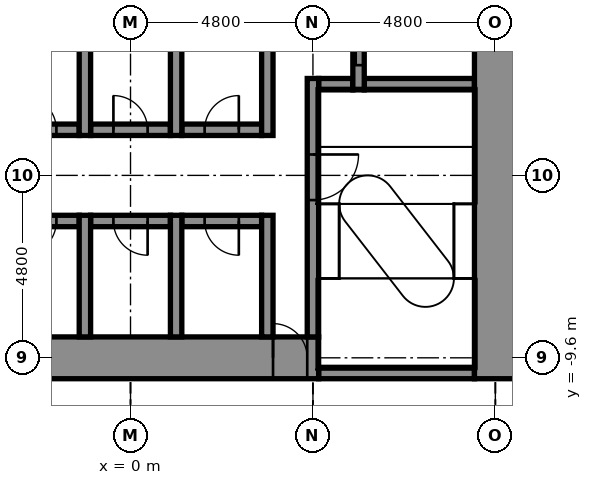
"""IFC4 building model, lengths in metres.
Left out: names, types, materials, properties, quantities, classifications, styles, units other than length and angle.
Written with IfcOpenShell. Run it as: python <this file> out.ifc"""

import sys

from ifc_helpers import new_model, si_unit, direction, frame, frame_2d, origin, place, context, subcontext, project, spatial, rectangle, extrude, element, fill, save


model = new_model("IFC4")
c1 = context("Model", 3, precision=1e-05, world=origin(), true_north=direction((0.0, 1.0)))
c2 = subcontext(c1, "Body", "Model", "MODEL_VIEW")
j1 = project(units=[si_unit("LENGTHUNIT", "METRE"), si_unit("PLANEANGLEUNIT", "RADIAN")], contexts=[c1])
p1 = place(None, origin())
s1 = spatial("IfcSite", under=j1, at=p1, CompositionType="ELEMENT")
p2 = place(p1, origin())
s2 = spatial("IfcBuilding", under=s1, at=p2, CompositionType="ELEMENT")
p3 = place(p2, frame((0.0, 0.0, 60.9)))
s3 = spatial("IfcBuildingStorey", under=s2, at=p3, CompositionType="ELEMENT", Elevation=60.9)
p4 = place(p3, frame((4.95, -10.0, -0.25), z_axis=(0.0, 0.0, 1.0), x_axis=(1.0, 0.0, 0.0)))
e1 = element("IfcWall", 1, at=p4, inside=s3, PredefinedType="STANDARD", context=c2, shape_type="SweptSolid", body=[
    extrude(rectangle(XDim=4.1, YDim=0.3, at=frame_2d((2.05, 0.0))), origin(), (0.0, 0.0, 1.0), 5.45),
])
p5 = place(p3, frame((-5.25, -9.6, -0.25), z_axis=(0.0, 0.0, 1.0), x_axis=(1.0, 0.0, 0.0)))
e2 = element("IfcWall", 2, at=p5, inside=s3, PredefinedType="SHEAR", context=c2, shape_type="SweptSolid", body=[
    extrude(rectangle(XDim=10.2, YDim=1.1, at=frame_2d((5.1, 0.0))), origin(), (0.0, 0.0, 1.0), 5.45),
])
p6 = place(p5, frame((9.0, 0.0, 0.25)))
e3 = element("IfcOpeningElement", 3, at=p6, cuts=e2, PredefinedType="OPENING", context=c2, shape_type="SweptSolid", body=[
    extrude(rectangle(XDim=0.9, YDim=2.1, at=frame_2d((0.45, 1.05))), frame((0.0, 0.56, 0.0), z_axis=(0.0, -1.0, 0.0), x_axis=(1.0, 0.0, 0.0)), (0.0, 0.0, 1.0), 1.12),
])
p7 = place(p3, frame((-3.45, -6.0, -0.25), z_axis=(0.0, 0.0, 1.0), x_axis=(1.0, 0.0, 0.0)))
e4 = element("IfcWall", 4, at=p7, inside=s3, PredefinedType="STANDARD", context=c2, shape_type="SweptSolid", body=[
    extrude(rectangle(XDim=2.1, YDim=0.3, at=frame_2d((1.05, 0.0))), origin(), (0.0, 0.0, 1.0), 5.45),
])
p8 = place(p7, frame((0.6, 0.0, 0.25)))
e5 = element("IfcOpeningElement", 5, at=p8, cuts=e4, PredefinedType="OPENING", context=c2, shape_type="SweptSolid", body=[
    extrude(rectangle(XDim=0.9, YDim=2.1, at=frame_2d((0.45, 1.05))), frame((0.0, 0.16, 0.0), z_axis=(0.0, -1.0, 0.0), x_axis=(1.0, 0.0, 0.0)), (0.0, 0.0, 1.0), 0.32),
])
p9 = place(p3, frame((-1.05, -6.0, -0.25), z_axis=(0.0, 0.0, 1.0), x_axis=(1.0, 0.0, 0.0)))
e6 = element("IfcWall", 6, at=p9, inside=s3, PredefinedType="STANDARD", context=c2, shape_type="SweptSolid", body=[
    extrude(rectangle(XDim=2.1, YDim=0.3, at=frame_2d((1.05, 0.0))), origin(), (0.0, 0.0, 1.0), 5.45),
])
p10 = place(p9, frame((0.6, 0.0, 0.25)))
e7 = element("IfcOpeningElement", 7, at=p10, cuts=e6, PredefinedType="OPENING", context=c2, shape_type="SweptSolid", body=[
    extrude(rectangle(XDim=0.9, YDim=2.1, at=frame_2d((0.45, 1.05))), frame((0.0, 0.16, 0.0), z_axis=(0.0, -1.0, 0.0), x_axis=(1.0, 0.0, 0.0)), (0.0, 0.0, 1.0), 0.32),
])
p11 = place(p3, frame((1.35, -6.0, -0.25), z_axis=(0.0, 0.0, 1.0), x_axis=(1.0, 0.0, 0.0)))
e8 = element("IfcWall", 8, at=p11, inside=s3, PredefinedType="STANDARD", context=c2, shape_type="SweptSolid", body=[
    extrude(rectangle(XDim=2.1, YDim=0.3, at=frame_2d((1.05, 0.0))), origin(), (0.0, 0.0, 1.0), 5.45),
])
p12 = place(p11, frame((0.6, 0.0, 0.25)))
e9 = element("IfcOpeningElement", 9, at=p12, cuts=e8, PredefinedType="OPENING", context=c2, shape_type="SweptSolid", body=[
    extrude(rectangle(XDim=0.9, YDim=2.1, at=frame_2d((0.45, 1.05))), frame((0.0, 0.16, 0.0), z_axis=(0.0, -1.0, 0.0), x_axis=(1.0, 0.0, 0.0)), (0.0, 0.0, 1.0), 0.32),
])
p13 = place(p3, frame((-3.45, -3.6, -0.25), z_axis=(0.0, 0.0, 1.0), x_axis=(1.0, 0.0, 0.0)))
e10 = element("IfcWall", 10, at=p13, inside=s3, PredefinedType="STANDARD", context=c2, shape_type="SweptSolid", body=[
    extrude(rectangle(XDim=2.1, YDim=0.3, at=frame_2d((1.05, 0.0))), origin(), (0.0, 0.0, 1.0), 5.45),
])
p14 = place(p13, frame((0.6, 0.0, 0.25)))
e11 = element("IfcOpeningElement", 11, at=p14, cuts=e10, PredefinedType="OPENING", context=c2, shape_type="SweptSolid", body=[
    extrude(rectangle(XDim=0.9, YDim=2.1, at=frame_2d((0.45, 1.05))), frame((0.0, 0.16, 0.0), z_axis=(0.0, -1.0, 0.0), x_axis=(1.0, 0.0, 0.0)), (0.0, 0.0, 1.0), 0.32),
])
p15 = place(p3, frame((-1.05, -3.6, -0.25), z_axis=(0.0, 0.0, 1.0), x_axis=(1.0, 0.0, 0.0)))
e12 = element("IfcWall", 12, at=p15, inside=s3, PredefinedType="STANDARD", context=c2, shape_type="SweptSolid", body=[
    extrude(rectangle(XDim=2.1, YDim=0.3, at=frame_2d((1.05, 0.0))), origin(), (0.0, 0.0, 1.0), 5.45),
])
p16 = place(p15, frame((0.6, 0.0, 0.25)))
e13 = element("IfcOpeningElement", 13, at=p16, cuts=e12, PredefinedType="OPENING", context=c2, shape_type="SweptSolid", body=[
    extrude(rectangle(XDim=0.9, YDim=2.1, at=frame_2d((0.45, 1.05))), frame((0.0, 0.16, 0.0), z_axis=(0.0, -1.0, 0.0), x_axis=(1.0, 0.0, 0.0)), (0.0, 0.0, 1.0), 0.32),
])
p17 = place(p3, frame((1.35, -3.6, -0.25), z_axis=(0.0, 0.0, 1.0), x_axis=(1.0, 0.0, 0.0)))
e14 = element("IfcWall", 14, at=p17, inside=s3, PredefinedType="STANDARD", context=c2, shape_type="SweptSolid", body=[
    extrude(rectangle(XDim=2.1, YDim=0.3, at=frame_2d((1.05, 0.0))), origin(), (0.0, 0.0, 1.0), 5.45),
])
p18 = place(p17, frame((0.6, 0.0, 0.25)))
e15 = element("IfcOpeningElement", 15, at=p18, cuts=e14, PredefinedType="OPENING", context=c2, shape_type="SweptSolid", body=[
    extrude(rectangle(XDim=0.9, YDim=2.1, at=frame_2d((0.45, 1.05))), frame((0.0, 0.16, 0.0), z_axis=(0.0, -1.0, 0.0), x_axis=(1.0, 0.0, 0.0)), (0.0, 0.0, 1.0), 0.32),
])
p19 = place(p3, frame((4.95, -2.4, -0.25), z_axis=(0.0, 0.0, 1.0), x_axis=(1.0, 0.0, 0.0)))
e16 = element("IfcWall", 16, at=p19, inside=s3, PredefinedType="STANDARD", context=c2, shape_type="SweptSolid", body=[
    extrude(rectangle(XDim=0.9, YDim=0.3, at=frame_2d((0.45, 0.0))), origin(), (0.0, 0.0, 1.0), 5.45),
])
p20 = place(p3, frame((6.15, -2.4, -0.25), z_axis=(0.0, 0.0, 1.0), x_axis=(1.0, 0.0, 0.0)))
e17 = element("IfcWall", 17, at=p20, inside=s3, PredefinedType="STANDARD", context=c2, shape_type="SweptSolid", body=[
    extrude(rectangle(XDim=2.9, YDim=0.3, at=frame_2d((1.45, 0.0))), origin(), (0.0, 0.0, 1.0), 5.45),
])
p21 = place(p3, frame((-1.2, -9.05, -0.25), z_axis=(0.0, 0.0, 1.0), x_axis=(0.0, 1.0, 0.0)))
e18 = element("IfcWall", 18, at=p21, inside=s3, PredefinedType="STANDARD", context=c2, shape_type="SweptSolid", body=[
    extrude(rectangle(XDim=3.2, YDim=0.3, at=frame_2d((1.6, 0.0))), origin(), (0.0, 0.0, 1.0), 5.45),
])
p22 = place(p3, frame((-1.2, -3.75, -0.25), z_axis=(0.0, 0.0, 1.0), x_axis=(0.0, 1.0, 0.0)))
e19 = element("IfcWall", 19, at=p22, inside=s3, PredefinedType="STANDARD", context=c2, shape_type="SweptSolid", body=[
    extrude(rectangle(XDim=7.5, YDim=0.3, at=frame_2d((3.75, 0.0))), origin(), (0.0, 0.0, 1.0), 5.45),
])
p23 = place(p3, frame((1.2, -9.05, -0.25), z_axis=(0.0, 0.0, 1.0), x_axis=(0.0, 1.0, 0.0)))
e20 = element("IfcWall", 20, at=p23, inside=s3, PredefinedType="STANDARD", context=c2, shape_type="SweptSolid", body=[
    extrude(rectangle(XDim=3.2, YDim=0.3, at=frame_2d((1.6, 0.0))), origin(), (0.0, 0.0, 1.0), 5.45),
])
p24 = place(p3, frame((1.2, -3.75, -0.25), z_axis=(0.0, 0.0, 1.0), x_axis=(0.0, 1.0, 0.0)))
e21 = element("IfcWall", 21, at=p24, inside=s3, PredefinedType="STANDARD", context=c2, shape_type="SweptSolid", body=[
    extrude(rectangle(XDim=7.5, YDim=0.3, at=frame_2d((3.75, 0.0))), origin(), (0.0, 0.0, 1.0), 5.45),
])
p25 = place(p3, frame((3.6, -9.05, -0.25), z_axis=(0.0, 0.0, 1.0), x_axis=(0.0, 1.0, 0.0)))
e22 = element("IfcWall", 22, at=p25, inside=s3, PredefinedType="STANDARD", context=c2, shape_type="SweptSolid", body=[
    extrude(rectangle(XDim=3.2, YDim=0.3, at=frame_2d((1.6, 0.0))), origin(), (0.0, 0.0, 1.0), 5.45),
])
p26 = place(p3, frame((3.6, -3.75, -0.25), z_axis=(0.0, 0.0, 1.0), x_axis=(0.0, 1.0, 0.0)))
e23 = element("IfcWall", 23, at=p26, inside=s3, PredefinedType="STANDARD", context=c2, shape_type="SweptSolid", body=[
    extrude(rectangle(XDim=7.5, YDim=0.3, at=frame_2d((3.75, 0.0))), origin(), (0.0, 0.0, 1.0), 5.45),
])
p27 = place(p3, frame((4.8, -9.05, -0.25), z_axis=(0.0, 0.0, 1.0), x_axis=(0.0, 1.0, 0.0)))
e24 = element("IfcWall", 24, at=p27, inside=s3, PredefinedType="STANDARD", context=c2, shape_type="SweptSolid", body=[
    extrude(rectangle(XDim=6.8, YDim=0.3, at=frame_2d((3.4, 0.0))), origin(), (0.0, 0.0, 1.0), 5.45),
])
p28 = place(p27, frame((3.6, 0.0, 0.25)))
e25 = element("IfcOpeningElement", 25, at=p28, cuts=e24, PredefinedType="OPENING", context=c2, shape_type="SweptSolid", body=[
    extrude(rectangle(XDim=1.2, YDim=2.1, at=frame_2d((0.6, 1.05))), frame((0.0, 0.16, 0.0), z_axis=(0.0, -1.0, 0.0), x_axis=(1.0, 0.0, 0.0)), (0.0, 0.0, 1.0), 0.32),
])
p29 = place(p3, frame((6.0, -2.55, -0.25), z_axis=(0.0, 0.0, 1.0), x_axis=(0.0, 1.0, 0.0)))
e26 = element("IfcWall", 26, at=p29, inside=s3, PredefinedType="STANDARD", context=c2, shape_type="SweptSolid", body=[
    extrude(rectangle(XDim=7.5, YDim=0.3, at=frame_2d((3.75, 0.0))), origin(), (0.0, 0.0, 1.0), 5.45),
])
p30 = place(p29, frame((0.65, 0.0, 0.25)))
e27 = element("IfcOpeningElement", 27, at=p30, cuts=e26, PredefinedType="OPENING", context=c2, shape_type="SweptSolid", body=[
    extrude(rectangle(XDim=1.4, YDim=2.1, at=frame_2d((0.7, 1.05))), frame((0.0, 0.16, 0.0), z_axis=(0.0, -1.0, 0.0), x_axis=(1.0, 0.0, 0.0)), (0.0, 0.0, 1.0), 0.32),
])
p31 = place(p29, frame((3.05, 0.0, 0.25)))
e28 = element("IfcOpeningElement", 28, at=p31, cuts=e26, PredefinedType="OPENING", context=c2, shape_type="SweptSolid", body=[
    extrude(rectangle(XDim=1.4, YDim=2.1, at=frame_2d((0.7, 1.05))), frame((0.0, 0.16, 0.0), z_axis=(0.0, -1.0, 0.0), x_axis=(1.0, 0.0, 0.0)), (0.0, 0.0, 1.0), 0.32),
])
p32 = place(p29, frame((5.45, 0.0, 0.25)))
e29 = element("IfcOpeningElement", 29, at=p32, cuts=e26, PredefinedType="OPENING", context=c2, shape_type="SweptSolid", body=[
    extrude(rectangle(XDim=1.4, YDim=2.1, at=frame_2d((0.7, 1.05))), frame((0.0, 0.16, 0.0), z_axis=(0.0, -1.0, 0.0), x_axis=(1.0, 0.0, 0.0)), (0.0, 0.0, 1.0), 0.32),
])
p33 = place(p3, frame((9.6, -10.15, -0.25), z_axis=(0.0, 0.0, 1.0), x_axis=(0.0, 1.0, 0.0)))
e30 = element("IfcWall", 30, at=p33, inside=s3, PredefinedType="SHEAR", context=c2, shape_type="SweptSolid", body=[
    extrude(rectangle(XDim=20.3, YDim=1.1, at=frame_2d((10.15, 0.0))), origin(), (0.0, 0.0, 1.0), 5.45),
])
p34 = place(p30, origin())
e31 = element("IfcDoor", 31, at=p34, inside=s3, OperationType="DOUBLE_DOOR_SLIDING", PredefinedType="DOOR", context=c2, shape_type="SweptSolid", body=[
    extrude(rectangle(XDim=1.4, YDim=2.1, at=frame_2d((0.7, 1.05))), frame((0.0, 0.025, 0.0), z_axis=(0.0, -1.0, 0.0), x_axis=(1.0, 0.0, 0.0)), (0.0, 0.0, 1.0), 0.05),
])
fill(e27, e31)
p35 = place(p28, frame((1.2, 0.0, 0.0), z_axis=(0.0, 0.0, 1.0), x_axis=(-1.0, 0.0, 0.0)))
e32 = element("IfcDoor", 32, at=p35, inside=s3, OperationType="SINGLE_SWING_RIGHT", PredefinedType="DOOR", context=c2, shape_type="SweptSolid", body=[
    extrude(rectangle(XDim=1.2, YDim=2.1, at=frame_2d((0.6, 1.05))), frame((0.0, 0.025, 0.0), z_axis=(0.0, -1.0, 0.0), x_axis=(1.0, 0.0, 0.0)), (0.0, 0.0, 1.0), 0.05),
])
fill(e25, e32)
p36 = place(p14, origin())
e33 = element("IfcDoor", 33, at=p36, inside=s3, OperationType="SINGLE_SWING_LEFT", PredefinedType="DOOR", context=c2, shape_type="SweptSolid", body=[
    extrude(rectangle(XDim=0.9, YDim=2.1, at=frame_2d((0.45, 1.05))), frame((0.0, 0.025, 0.0), z_axis=(0.0, -1.0, 0.0), x_axis=(1.0, 0.0, 0.0)), (0.0, 0.0, 1.0), 0.05),
])
fill(e11, e33)
p37 = place(p16, origin())
e34 = element("IfcDoor", 34, at=p37, inside=s3, OperationType="SINGLE_SWING_LEFT", PredefinedType="DOOR", context=c2, shape_type="SweptSolid", body=[
    extrude(rectangle(XDim=0.9, YDim=2.1, at=frame_2d((0.45, 1.05))), frame((0.0, 0.025, 0.0), z_axis=(0.0, -1.0, 0.0), x_axis=(1.0, 0.0, 0.0)), (0.0, 0.0, 1.0), 0.05),
])
fill(e13, e34)
p38 = place(p18, origin())
e35 = element("IfcDoor", 35, at=p38, inside=s3, OperationType="SINGLE_SWING_RIGHT", PredefinedType="DOOR", context=c2, shape_type="SweptSolid", body=[
    extrude(rectangle(XDim=0.9, YDim=2.1, at=frame_2d((0.45, 1.05))), frame((0.0, 0.025, 0.0), z_axis=(0.0, -1.0, 0.0), x_axis=(1.0, 0.0, 0.0)), (0.0, 0.0, 1.0), 0.05),
])
fill(e15, e35)
p39 = place(p8, frame((0.9, 0.0, 0.0), z_axis=(0.0, 0.0, 1.0), x_axis=(-1.0, 0.0, 0.0)))
e36 = element("IfcDoor", 36, at=p39, inside=s3, OperationType="SINGLE_SWING_LEFT", PredefinedType="DOOR", context=c2, shape_type="SweptSolid", body=[
    extrude(rectangle(XDim=0.9, YDim=2.1, at=frame_2d((0.45, 1.05))), frame((0.0, 0.025, 0.0), z_axis=(0.0, -1.0, 0.0), x_axis=(1.0, 0.0, 0.0)), (0.0, 0.0, 1.0), 0.05),
])
fill(e5, e36)
p40 = place(p10, frame((0.9, 0.0, 0.0), z_axis=(0.0, 0.0, 1.0), x_axis=(-1.0, 0.0, 0.0)))
e37 = element("IfcDoor", 37, at=p40, inside=s3, OperationType="SINGLE_SWING_RIGHT", PredefinedType="DOOR", context=c2, shape_type="SweptSolid", body=[
    extrude(rectangle(XDim=0.9, YDim=2.1, at=frame_2d((0.45, 1.05))), frame((0.0, 0.025, 0.0), z_axis=(0.0, -1.0, 0.0), x_axis=(1.0, 0.0, 0.0)), (0.0, 0.0, 1.0), 0.05),
])
fill(e7, e37)
p41 = place(p12, frame((0.9, 0.0, 0.0), z_axis=(0.0, 0.0, 1.0), x_axis=(-1.0, 0.0, 0.0)))
e38 = element("IfcDoor", 38, at=p41, inside=s3, OperationType="SINGLE_SWING_RIGHT", PredefinedType="DOOR", context=c2, shape_type="SweptSolid", body=[
    extrude(rectangle(XDim=0.9, YDim=2.1, at=frame_2d((0.45, 1.05))), frame((0.0, 0.025, 0.0), z_axis=(0.0, -1.0, 0.0), x_axis=(1.0, 0.0, 0.0)), (0.0, 0.0, 1.0), 0.05),
])
fill(e9, e38)
p42 = place(p6, origin())
e39 = element("IfcDoor", 39, at=p42, inside=s3, OperationType="SINGLE_SWING_LEFT", PredefinedType="DOOR", context=c2, shape_type="SweptSolid", body=[
    extrude(rectangle(XDim=0.9, YDim=2.1, at=frame_2d((0.45, 1.05))), frame((0.0, 0.025, 0.0), z_axis=(0.0, -1.0, 0.0), x_axis=(1.0, 0.0, 0.0)), (0.0, 0.0, 1.0), 0.05),
])
fill(e3, e39)
save(model, sys.argv[1])
